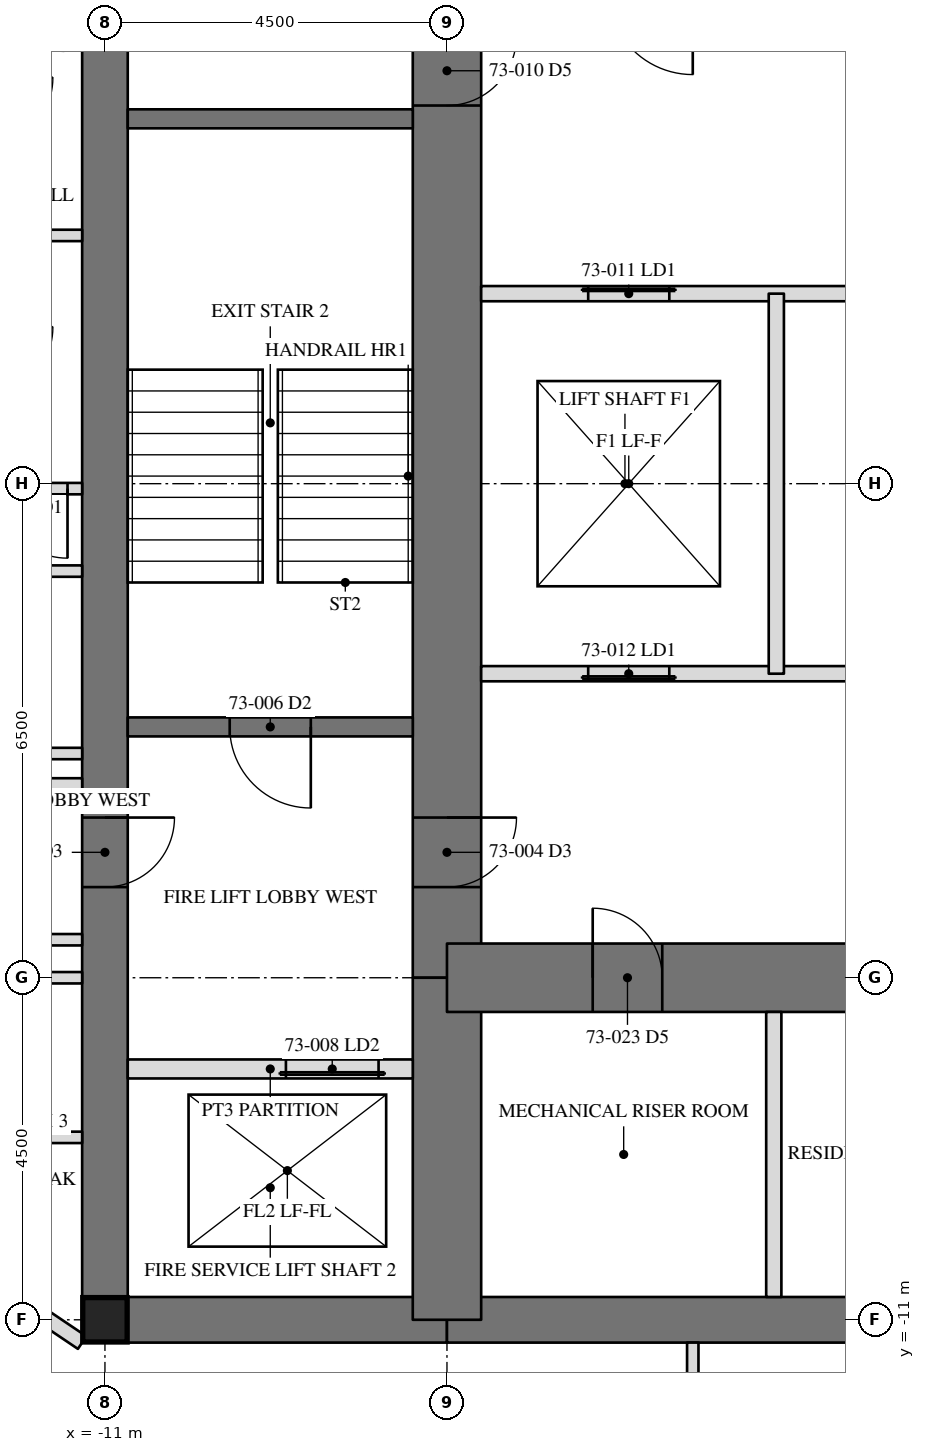
"""IFC4 building model, lengths in metres.
Left out: names, types, materials, properties, quantities, classifications, styles, units other than length and angle.
Written with IfcOpenShell. Run it as: python <this file> out.ifc"""

import sys

from ifc_helpers import new_model, si_unit, direction, frame, frame_2d, origin, origin_2d, place, context, subcontext, project, spatial, rectangle, hollow_rectangle, extrude, element, fill, save


model = new_model("IFC4")
c1 = context("Model", 3, precision=1e-05, world=origin(), true_north=direction((0.0, 1.0)))
c2 = subcontext(c1, "Body", "Model", "MODEL_VIEW")
j1 = project(units=[si_unit("LENGTHUNIT", "METRE"), si_unit("PLANEANGLEUNIT", "RADIAN")], contexts=[c1])
p1 = place(None, origin())
s1 = spatial("IfcSite", under=j1, at=p1, CompositionType="ELEMENT")
p2 = place(p1, origin())
s2 = spatial("IfcBuilding", under=s1, at=p2, CompositionType="ELEMENT")
p3 = place(p2, frame((0.0, 0.0, 295.6)))
s3 = spatial("IfcBuildingStorey", under=s2, at=p3, CompositionType="ELEMENT", Elevation=295.6)
p4 = place(p3, frame((-11.0, 11.0, 0.0), z_axis=(0.0, 0.0, 1.0), x_axis=(0.0, -1.0, 0.0)))
e1 = element("IfcWall", 1, at=p4, inside=s3, PredefinedType="SHEAR", context=c2, shape_type="SweptSolid", body=[
    extrude(rectangle(XDim=22.0, YDim=0.6, at=frame_2d((11.0, 0.0))), origin(), (0.0, 0.0, 1.0), 3.6),
])
p5 = place(p4, frame((15.393, 0.0, 0.0)))
e2 = element("IfcOpeningElement", 2, at=p5, cuts=e1, PredefinedType="OPENING", context=c2, shape_type="SweptSolid", body=[
    extrude(rectangle(XDim=0.915, YDim=2.134, at=frame_2d((0.458, 1.067))), frame((0.0, 0.31, 0.0), z_axis=(0.0, -1.0, 0.0), x_axis=(1.0, 0.0, 0.0)), (0.0, 0.0, 1.0), 0.62),
])
p6 = place(p3, frame((-11.0, -11.0, 0.0), z_axis=(0.0, 0.0, 1.0), x_axis=(1.0, 0.0, 0.0)))
e3 = element("IfcWall", 3, at=p6, inside=s3, PredefinedType="SHEAR", context=c2, shape_type="SweptSolid", body=[
    extrude(rectangle(XDim=4.5, YDim=0.6, at=frame_2d((2.25, 0.0))), origin(), (0.0, 0.0, 1.0), 3.6),
])
p7 = place(p3, frame((-6.5, -11.0, 0.0), z_axis=(0.0, 0.0, 1.0), x_axis=(1.0, 0.0, 0.0)))
e4 = element("IfcWall", 4, at=p7, inside=s3, PredefinedType="SHEAR", context=c2, shape_type="SweptSolid", body=[
    extrude(rectangle(XDim=13.0, YDim=0.6, at=frame_2d((6.5, 0.0))), origin(), (0.0, 0.0, 1.0), 3.6),
])
p8 = place(p7, frame((6.0, 0.0, 0.0)))
e5 = element("IfcOpeningElement", 5, at=p8, cuts=e4, PredefinedType="OPENING", context=c2, shape_type="SweptSolid", body=[
    extrude(rectangle(XDim=1.0, YDim=2.134, at=frame_2d((0.5, 1.067))), frame((0.0, 0.31, 0.0), z_axis=(0.0, -1.0, 0.0), x_axis=(1.0, 0.0, 0.0)), (0.0, 0.0, 1.0), 0.62),
])
p9 = place(p3, frame((-6.5, 6.5, 0.0), z_axis=(0.0, 0.0, 1.0), x_axis=(0.0, -1.0, 0.0)))
e6 = element("IfcWall", 6, at=p9, inside=s3, PredefinedType="SHEAR", context=c2, shape_type="SweptSolid", body=[
    extrude(rectangle(XDim=13.0, YDim=0.9, at=frame_2d((6.5, 0.0))), origin(), (0.0, 0.0, 1.0), 3.6),
])
p10 = place(p9, frame((10.893, 0.0, 0.0)))
e7 = element("IfcOpeningElement", 7, at=p10, cuts=e6, PredefinedType="OPENING", context=c2, shape_type="SweptSolid", body=[
    extrude(rectangle(XDim=0.915, YDim=2.134, at=frame_2d((0.458, 1.067))), frame((0.0, 0.46, 0.0), z_axis=(0.0, -1.0, 0.0), x_axis=(1.0, 0.0, 0.0)), (0.0, 0.0, 1.0), 0.92),
])
p11 = place(p9, frame((0.61, 0.0, 0.0)))
e8 = element("IfcOpeningElement", 8, at=p11, cuts=e6, PredefinedType="OPENING", context=c2, shape_type="SweptSolid", body=[
    extrude(rectangle(XDim=0.915, YDim=2.134, at=frame_2d((0.458, 1.067))), frame((0.0, 0.46, 0.0), z_axis=(0.0, -1.0, 0.0), x_axis=(1.0, 0.0, 0.0)), (0.0, 0.0, 1.0), 0.92),
])
p12 = place(p3, frame((-6.5, -6.5, 0.0), z_axis=(0.0, 0.0, 1.0), x_axis=(0.0, -1.0, 0.0)))
e9 = element("IfcWall", 9, at=p12, inside=s3, PredefinedType="SHEAR", context=c2, shape_type="SweptSolid", body=[
    extrude(rectangle(XDim=4.5, YDim=0.9, at=frame_2d((2.25, 0.0))), origin(), (0.0, 0.0, 1.0), 3.6),
])
p13 = place(p3, frame((-6.5, -6.5, 0.0), z_axis=(0.0, 0.0, 1.0), x_axis=(1.0, 0.0, 0.0)))
e10 = element("IfcWall", 10, at=p13, inside=s3, PredefinedType="SHEAR", context=c2, shape_type="SweptSolid", body=[
    extrude(rectangle(XDim=13.0, YDim=0.9, at=frame_2d((6.5, 0.0))), origin(), (0.0, 0.0, 1.0), 3.6),
])
p14 = place(p13, frame((6.042, 0.0, 0.0)))
e11 = element("IfcOpeningElement", 11, at=p14, cuts=e10, PredefinedType="OPENING", context=c2, shape_type="SweptSolid", body=[
    extrude(rectangle(XDim=0.915, YDim=2.134, at=frame_2d((0.458, 1.067))), frame((0.0, 0.46, 0.0), z_axis=(0.0, -1.0, 0.0), x_axis=(1.0, 0.0, 0.0)), (0.0, 0.0, 1.0), 0.92),
])
p15 = place(p13, frame((1.917, 0.0, 0.0)))
e12 = element("IfcOpeningElement", 12, at=p15, cuts=e10, PredefinedType="OPENING", context=c2, shape_type="SweptSolid", body=[
    extrude(rectangle(XDim=0.915, YDim=2.134, at=frame_2d((0.458, 1.067))), frame((0.0, 0.46, 0.0), z_axis=(0.0, -1.0, 0.0), x_axis=(1.0, 0.0, 0.0)), (0.0, 0.0, 1.0), 0.92),
])
p16 = place(p13, frame((9.567, 0.0, 0.0)))
e13 = element("IfcOpeningElement", 13, at=p16, cuts=e10, PredefinedType="OPENING", context=c2, shape_type="SweptSolid", body=[
    extrude(rectangle(XDim=0.915, YDim=2.134, at=frame_2d((0.458, 1.067))), frame((0.0, 0.46, 0.0), z_axis=(0.0, -1.0, 0.0), x_axis=(1.0, 0.0, 0.0)), (0.0, 0.0, 1.0), 0.92),
])
p17 = place(p3, frame((-11.0, -11.0, 0.0), z_axis=(0.0, 0.0, 1.0), x_axis=(1.0, 0.0, 0.0)))
e14 = element("IfcColumn", 14, at=p17, inside=s3, PredefinedType="COLUMN", context=c2, shape_type="SweptSolid", body=[
    extrude(hollow_rectangle(XDim=0.584, YDim=0.584, WallThickness=0.051, at=origin_2d()), origin(), (0.0, 0.0, 1.0), 3.6),
])
p18 = place(p3, frame((-6.95, 4.8, 0.0), z_axis=(0.0, 0.0, 1.0), x_axis=(-1.0, 0.0, 0.0)))
e15 = element("IfcWall", 15, at=p18, inside=s3, PredefinedType="SOLIDWALL", context=c2, shape_type="SweptSolid", body=[
    extrude(rectangle(XDim=3.75, YDim=0.25, at=frame_2d((1.875, 0.0))), origin(), (0.0, 0.0, 1.0), 3.41),
])
p19 = place(p3, frame((-6.95, -3.2, 0.0), z_axis=(0.0, 0.0, 1.0), x_axis=(-1.0, 0.0, 0.0)))
e16 = element("IfcWall", 16, at=p19, inside=s3, PredefinedType="SOLIDWALL", context=c2, shape_type="SweptSolid", body=[
    extrude(rectangle(XDim=3.75, YDim=0.25, at=frame_2d((1.875, 0.0))), origin(), (0.0, 0.0, 1.0), 3.41),
])
p20 = place(p19, frame((1.342, 0.0, 0.0)))
e17 = element("IfcOpeningElement", 17, at=p20, cuts=e16, PredefinedType="OPENING", context=c2, shape_type="SweptSolid", body=[
    extrude(rectangle(XDim=1.067, YDim=2.134, at=frame_2d((0.533, 1.067))), frame((0.0, 0.135, 0.0), z_axis=(0.0, -1.0, 0.0), x_axis=(1.0, 0.0, 0.0)), (0.0, 0.0, 1.0), 0.27),
])
p21 = place(p3, frame((-6.95, -7.7, 0.0), z_axis=(0.0, 0.0, 1.0), x_axis=(-1.0, 0.0, 0.0)))
e18 = element("IfcWall", 18, at=p21, inside=s3, PredefinedType="PARTITIONING", context=c2, shape_type="SweptSolid", body=[
    extrude(rectangle(XDim=3.75, YDim=0.25, at=frame_2d((1.875, 0.0))), origin(), (0.0, 0.0, 1.0), 3.41),
])
p22 = place(p21, frame((0.45, 0.0, 0.0)))
e19 = element("IfcOpeningElement", 19, at=p22, cuts=e18, PredefinedType="OPENING", context=c2, shape_type="SweptSolid", body=[
    extrude(rectangle(XDim=1.219, YDim=2.134, at=frame_2d((0.609, 1.067))), frame((0.0, 0.135, 0.0), z_axis=(0.0, -1.0, 0.0), x_axis=(1.0, 0.0, 0.0)), (0.0, 0.0, 1.0), 0.27),
])
p23 = place(p3, frame((-6.05, 2.5, 0.0), z_axis=(0.0, 0.0, 1.0), x_axis=(1.0, 0.0, 0.0)))
e20 = element("IfcWall", 20, at=p23, inside=s3, PredefinedType="PARTITIONING", context=c2, shape_type="SweptSolid", body=[
    extrude(rectangle(XDim=12.1, YDim=0.2, at=frame_2d((6.05, 0.0))), origin(), (0.0, 0.0, 1.0), 3.41),
])
p24 = place(p23, frame((1.408, 0.0, 0.0)))
e21 = element("IfcOpeningElement", 21, at=p24, cuts=e20, PredefinedType="OPENING", context=c2, shape_type="SweptSolid", body=[
    extrude(rectangle(XDim=1.067, YDim=2.134, at=frame_2d((0.533, 1.067))), frame((0.0, 0.11, 0.0), z_axis=(0.0, -1.0, 0.0), x_axis=(1.0, 0.0, 0.0)), (0.0, 0.0, 1.0), 0.22),
])
p25 = place(p23, frame((5.517, 0.0, 0.0)))
e22 = element("IfcOpeningElement", 22, at=p25, cuts=e20, PredefinedType="OPENING", context=c2, shape_type="SweptSolid", body=[
    extrude(rectangle(XDim=1.067, YDim=2.134, at=frame_2d((0.533, 1.067))), frame((0.0, 0.11, 0.0), z_axis=(0.0, -1.0, 0.0), x_axis=(1.0, 0.0, 0.0)), (0.0, 0.0, 1.0), 0.22),
])
p26 = place(p23, frame((9.625, 0.0, 0.0)))
e23 = element("IfcOpeningElement", 23, at=p26, cuts=e20, PredefinedType="OPENING", context=c2, shape_type="SweptSolid", body=[
    extrude(rectangle(XDim=1.067, YDim=2.134, at=frame_2d((0.533, 1.067))), frame((0.0, 0.11, 0.0), z_axis=(0.0, -1.0, 0.0), x_axis=(1.0, 0.0, 0.0)), (0.0, 0.0, 1.0), 0.22),
])
p27 = place(p3, frame((6.05, -2.5, 0.0), z_axis=(0.0, 0.0, 1.0), x_axis=(-1.0, 0.0, 0.0)))
e24 = element("IfcWall", 24, at=p27, inside=s3, PredefinedType="PARTITIONING", context=c2, shape_type="SweptSolid", body=[
    extrude(rectangle(XDim=12.1, YDim=0.2, at=frame_2d((6.05, 0.0))), origin(), (0.0, 0.0, 1.0), 3.41),
])
p28 = place(p27, frame((9.625, 0.0, 0.0)))
e25 = element("IfcOpeningElement", 25, at=p28, cuts=e24, PredefinedType="OPENING", context=c2, shape_type="SweptSolid", body=[
    extrude(rectangle(XDim=1.067, YDim=2.134, at=frame_2d((0.533, 1.067))), frame((0.0, 0.11, 0.0), z_axis=(0.0, -1.0, 0.0), x_axis=(1.0, 0.0, 0.0)), (0.0, 0.0, 1.0), 0.22),
])
p29 = place(p27, frame((5.517, 0.0, 0.0)))
e26 = element("IfcOpeningElement", 26, at=p29, cuts=e24, PredefinedType="OPENING", context=c2, shape_type="SweptSolid", body=[
    extrude(rectangle(XDim=1.067, YDim=2.134, at=frame_2d((0.533, 1.067))), frame((0.0, 0.11, 0.0), z_axis=(0.0, -1.0, 0.0), x_axis=(1.0, 0.0, 0.0)), (0.0, 0.0, 1.0), 0.22),
])
p30 = place(p27, frame((1.408, 0.0, 0.0)))
e27 = element("IfcOpeningElement", 27, at=p30, cuts=e24, PredefinedType="OPENING", context=c2, shape_type="SweptSolid", body=[
    extrude(rectangle(XDim=1.067, YDim=2.134, at=frame_2d((0.533, 1.067))), frame((0.0, 0.11, 0.0), z_axis=(0.0, -1.0, 0.0), x_axis=(1.0, 0.0, 0.0)), (0.0, 0.0, 1.0), 0.22),
])
p31 = place(p3, frame((-2.167, -2.5, 0.0), z_axis=(0.0, 0.0, 1.0), x_axis=(0.0, 1.0, 0.0)))
e28 = element("IfcWall", 28, at=p31, inside=s3, PredefinedType="PARTITIONING", context=c2, shape_type="SweptSolid", body=[
    extrude(rectangle(XDim=5.0, YDim=0.2, at=frame_2d((2.5, 0.0))), origin(), (0.0, 0.0, 1.0), 3.41),
])
p32 = place(p3, frame((-2.2, -6.95, 0.0), z_axis=(0.0, 0.0, 1.0), x_axis=(0.0, -1.0, 0.0)))
e29 = element("IfcWall", 29, at=p32, inside=s3, PredefinedType="PARTITIONING", context=c2, shape_type="SweptSolid", body=[
    extrude(rectangle(XDim=3.75, YDim=0.2, at=frame_2d((1.875, 0.0))), origin(), (0.0, 0.0, 1.0), 3.41),
])
p33 = place(p3, frame((-11.3, -11.3, 0.0), z_axis=(0.0, 0.0, 1.0), x_axis=(-0.829279340477, 0.558834300538, 0.0)))
e30 = element("IfcWall", 30, at=p33, inside=s3, PredefinedType="PARTITIONING", context=c2, shape_type="SweptSolid", body=[
    extrude(rectangle(XDim=3.048, YDim=0.2, at=frame_2d((1.524, 0.0))), origin(), (0.0, 0.0, 1.0), 2.704),
])
p34 = place(p3, frame((-11.3, 3.266, 0.0), z_axis=(0.0, 0.0, 1.0), x_axis=(-1.0, 0.0, 0.0)))
e31 = element("IfcWall", 31, at=p34, inside=s3, PredefinedType="PARTITIONING", context=c2, shape_type="SweptSolid", body=[
    extrude(rectangle(XDim=5.615, YDim=0.15, at=frame_2d((2.808, 0.0))), origin(), (0.0, 0.0, 1.0), 2.709),
])
p35 = place(p3, frame((-11.3, -0.065, 0.0), z_axis=(0.0, 0.0, 1.0), x_axis=(-1.0, 0.0, 0.0)))
e32 = element("IfcWall", 32, at=p35, inside=s3, PredefinedType="PARTITIONING", context=c2, shape_type="SweptSolid", body=[
    extrude(rectangle(XDim=5.615, YDim=0.15, at=frame_2d((2.808, 0.0))), origin(), (0.0, 0.0, 1.0), 2.709),
])
p36 = place(p35, frame((0.192, 0.0, 0.0)))
e33 = element("IfcOpeningElement", 33, at=p36, cuts=e32, PredefinedType="OPENING", context=c2, shape_type="SweptSolid", body=[
    extrude(rectangle(XDim=0.915, YDim=2.134, at=frame_2d((0.458, 1.067))), frame((0.0, 0.085, 0.0), z_axis=(0.0, -1.0, 0.0), x_axis=(1.0, 0.0, 0.0)), (0.0, 0.0, 1.0), 0.17),
])
p37 = place(p3, frame((-11.3, -6.5, 0.0), z_axis=(0.0, 0.0, 1.0), x_axis=(-1.0, 0.0, 0.0)))
e34 = element("IfcWall", 34, at=p37, inside=s3, PredefinedType="PARTITIONING", context=c2, shape_type="SweptSolid", body=[
    extrude(rectangle(XDim=5.615, YDim=0.15, at=frame_2d((2.808, 0.0))), origin(), (0.0, 0.0, 1.0), 2.966),
])
p38 = place(p37, frame((2.742, 0.0, 0.0)))
e35 = element("IfcOpeningElement", 35, at=p38, cuts=e34, PredefinedType="OPENING", context=c2, shape_type="SweptSolid", body=[
    extrude(rectangle(XDim=0.915, YDim=2.134, at=frame_2d((0.458, 1.067))), frame((0.0, 0.085, 0.0), z_axis=(0.0, -1.0, 0.0), x_axis=(1.0, 0.0, 0.0)), (0.0, 0.0, 1.0), 0.17),
])
for number, where, z_axis, x_axis in (
    (36, (-11.3, -3.95, 0.0), (0.0, 0.0, 1.0), (-1.0, 0.0, 0.0)),
    (37, (-11.3, -6.0, 0.0), (0.0, 0.0, 1.0), (-1.0, 0.0, 0.0)),
):
    element("IfcWall", number, at=place(p3, frame(where, z_axis=z_axis, x_axis=x_axis)), inside=s3, PredefinedType="PARTITIONING", context=c2, shape_type="SweptSolid", body=[
        extrude(rectangle(XDim=1.525, YDim=0.15, at=frame_2d((0.762, 0.0))), origin(), (0.0, 0.0, 1.0), 3.41),
    ])
for number, where, z_axis, x_axis in (
    (38, (-11.3, -1.15, 0.0), (0.0, 0.0, 1.0), (-1.0, 0.0, 0.0)),
    (39, (-11.3, -3.55, 0.0), (0.0, 0.0, 1.0), (-1.0, 0.0, 0.0)),
):
    element("IfcWall", number, at=place(p3, frame(where, z_axis=z_axis, x_axis=x_axis)), inside=s3, PredefinedType="PARTITIONING", context=c2, shape_type="SweptSolid", body=[
        extrude(rectangle(XDim=2.725, YDim=0.15, at=frame_2d((1.362, 0.0))), origin(), (0.0, 0.0, 1.0), 3.41),
    ])
p39 = place(p3, frame((-11.3, -8.6, 0.0), z_axis=(0.0, 0.0, 1.0), x_axis=(-1.0, 0.0, 0.0)))
e40 = element("IfcWall", 40, at=p39, inside=s3, PredefinedType="PARTITIONING", context=c2, shape_type="SweptSolid", body=[
    extrude(rectangle(XDim=1.925, YDim=0.15, at=frame_2d((0.962, 0.0))), origin(), (0.0, 0.0, 1.0), 3.41),
])
p40 = place(p3, frame((-3.266, -11.3, 0.0), z_axis=(0.0, 0.0, 1.0), x_axis=(0.0, -1.0, 0.0)))
e41 = element("IfcWall", 41, at=p40, inside=s3, PredefinedType="PARTITIONING", context=c2, shape_type="SweptSolid", body=[
    extrude(rectangle(XDim=5.615, YDim=0.15, at=frame_2d((2.808, 0.0))), origin(), (0.0, 0.0, 1.0), 2.709),
])
p41 = place(p40, frame((3.242, 0.0, 0.0)))
e42 = element("IfcOpeningElement", 42, at=p41, cuts=e41, PredefinedType="OPENING", context=c2, shape_type="SweptSolid", body=[
    extrude(rectangle(XDim=0.915, YDim=2.134, at=frame_2d((0.458, 1.067))), frame((0.0, 0.085, 0.0), z_axis=(0.0, -1.0, 0.0), x_axis=(1.0, 0.0, 0.0)), (0.0, 0.0, 1.0), 0.17),
])
p42 = place(p5, origin())
e43 = element("IfcDoor", 43, at=p42, inside=s3, OperationType="SINGLE_SWING_RIGHT", PredefinedType="DOOR", context=c2, shape_type="SweptSolid", body=[
    extrude(rectangle(XDim=0.915, YDim=2.134, at=frame_2d((0.458, 1.067))), frame((0.0, -0.225, 0.0), z_axis=(0.0, -1.0, 0.0), x_axis=(1.0, 0.0, 0.0)), (0.0, 0.0, 1.0), 0.05),
])
fill(e2, e43)
p43 = place(p10, origin())
e44 = element("IfcDoor", 44, at=p43, inside=s3, OperationType="SINGLE_SWING_RIGHT", PredefinedType="DOOR", context=c2, shape_type="SweptSolid", body=[
    extrude(rectangle(XDim=0.915, YDim=2.134, at=frame_2d((0.458, 1.067))), frame((0.0, -0.375, 0.0), z_axis=(0.0, -1.0, 0.0), x_axis=(1.0, 0.0, 0.0)), (0.0, 0.0, 1.0), 0.05),
])
fill(e7, e44)
p44 = place(p20, origin())
e45 = element("IfcDoor", 45, at=p44, inside=s3, OperationType="SINGLE_SWING_LEFT", PredefinedType="DOOR", context=c2, shape_type="SweptSolid", body=[
    extrude(rectangle(XDim=1.067, YDim=2.134, at=frame_2d((0.533, 1.067))), frame((0.0, 0.025, 0.0), z_axis=(0.0, -1.0, 0.0), x_axis=(1.0, 0.0, 0.0)), (0.0, 0.0, 1.0), 0.05),
])
fill(e17, e45)
p45 = place(p22, origin())
e46 = element("IfcDoor", 46, at=p45, inside=s3, OperationType="SLIDING_TO_LEFT", PredefinedType="DOOR", context=c2, shape_type="SweptSolid", body=[
    extrude(rectangle(XDim=1.219, YDim=2.134, at=frame_2d((0.609, 1.067))), frame((0.0, 0.025, 0.0), z_axis=(0.0, -1.0, 0.0), x_axis=(1.0, 0.0, 0.0)), (0.0, 0.0, 1.0), 0.05),
])
fill(e19, e46)
p46 = place(p11, origin())
e47 = element("IfcDoor", 47, at=p46, inside=s3, OperationType="SINGLE_SWING_RIGHT", PredefinedType="DOOR", context=c2, shape_type="SweptSolid", body=[
    extrude(rectangle(XDim=0.915, YDim=2.134, at=frame_2d((0.458, 1.067))), frame((0.0, -0.375, 0.0), z_axis=(0.0, -1.0, 0.0), x_axis=(1.0, 0.0, 0.0)), (0.0, 0.0, 1.0), 0.05),
])
fill(e8, e47)
p47 = place(p24, origin())
e48 = element("IfcDoor", 48, at=p47, inside=s3, OperationType="SLIDING_TO_LEFT", PredefinedType="DOOR", context=c2, shape_type="SweptSolid", body=[
    extrude(rectangle(XDim=1.067, YDim=2.134, at=frame_2d((0.533, 1.067))), frame((0.0, 0.025, 0.0), z_axis=(0.0, -1.0, 0.0), x_axis=(1.0, 0.0, 0.0)), (0.0, 0.0, 1.0), 0.05),
])
fill(e21, e48)
p48 = place(p28, origin())
e49 = element("IfcDoor", 49, at=p48, inside=s3, OperationType="SLIDING_TO_LEFT", PredefinedType="DOOR", context=c2, shape_type="SweptSolid", body=[
    extrude(rectangle(XDim=1.067, YDim=2.134, at=frame_2d((0.533, 1.067))), frame((0.0, 0.025, 0.0), z_axis=(0.0, -1.0, 0.0), x_axis=(1.0, 0.0, 0.0)), (0.0, 0.0, 1.0), 0.05),
])
fill(e25, e49)
p49 = place(p15, origin())
e50 = element("IfcDoor", 50, at=p49, inside=s3, OperationType="SINGLE_SWING_RIGHT", PredefinedType="DOOR", context=c2, shape_type="SweptSolid", body=[
    extrude(rectangle(XDim=0.915, YDim=2.134, at=frame_2d((0.458, 1.067))), frame((0.0, -0.375, 0.0), z_axis=(0.0, -1.0, 0.0), x_axis=(1.0, 0.0, 0.0)), (0.0, 0.0, 1.0), 0.05),
])
fill(e12, e50)
p50 = place(p36, origin())
e51 = element("IfcDoor", 51, at=p50, inside=s3, OperationType="SINGLE_SWING_LEFT", PredefinedType="DOOR", context=c2, shape_type="SweptSolid", body=[
    extrude(rectangle(XDim=0.915, YDim=2.134, at=frame_2d((0.458, 1.067))), frame((0.0, 0.025, 0.0), z_axis=(0.0, -1.0, 0.0), x_axis=(1.0, 0.0, 0.0)), (0.0, 0.0, 1.0), 0.05),
])
fill(e33, e51)
save(model, sys.argv[1])
